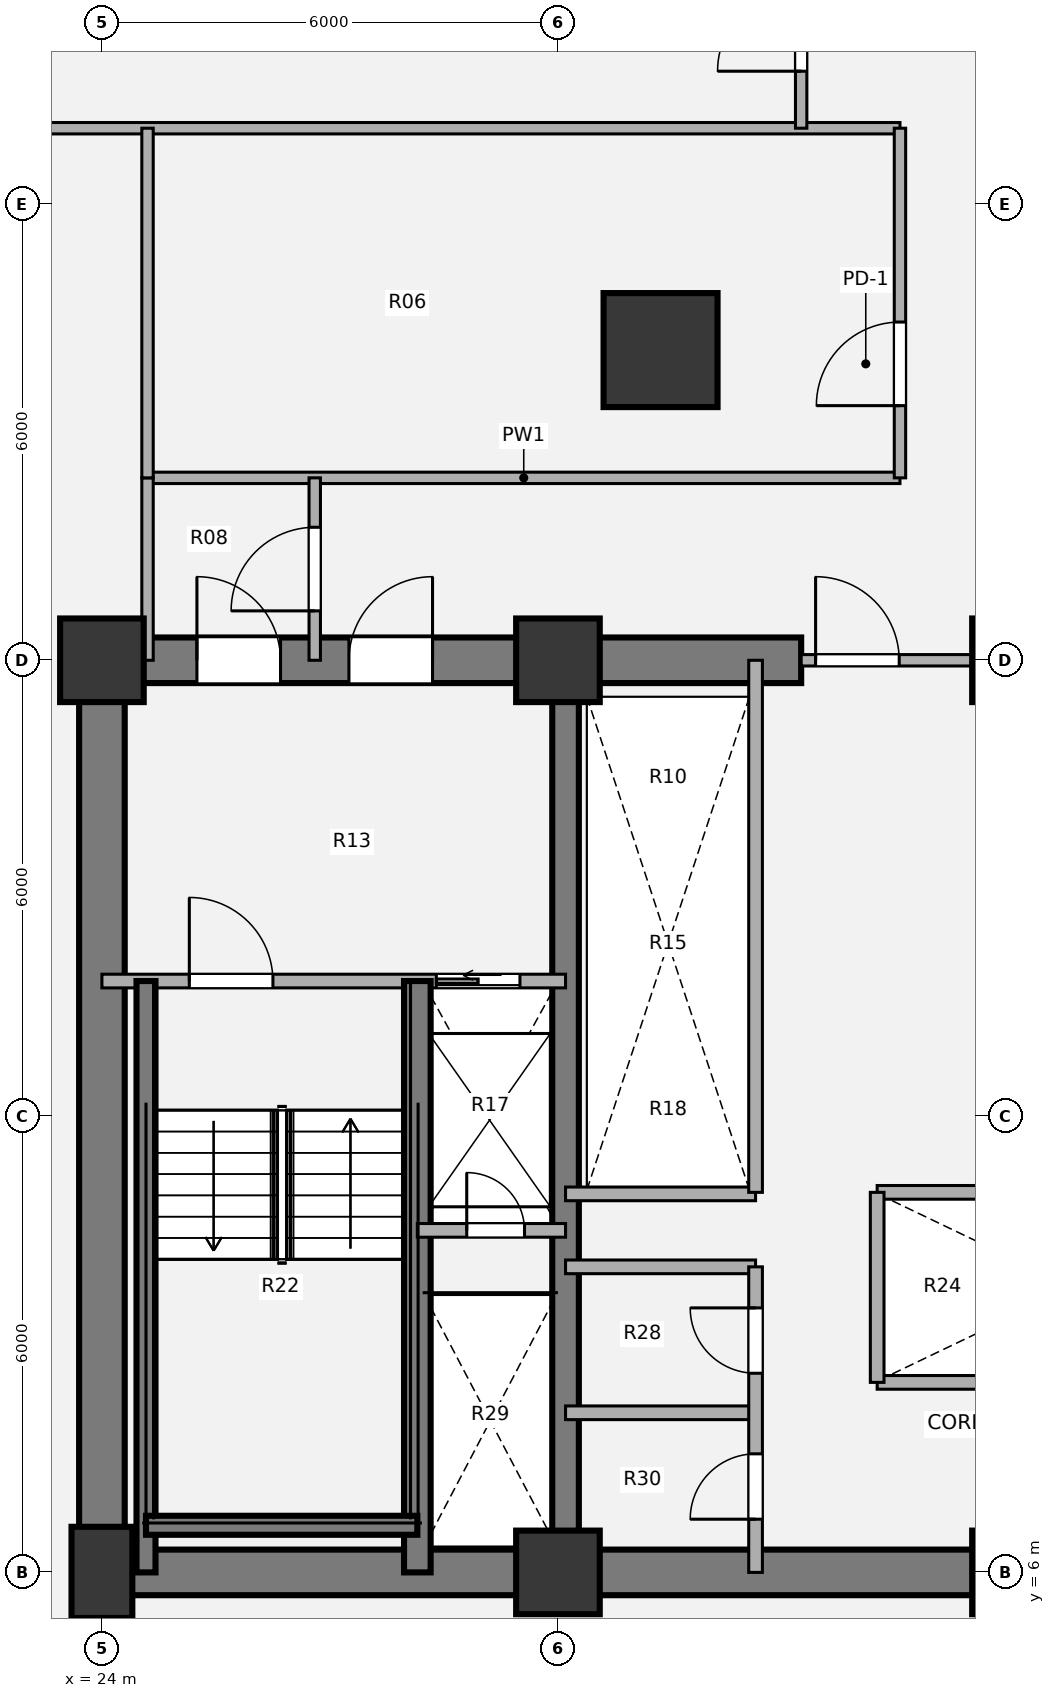
"""IFC4 building model, lengths in metres.
Left out: names, types, materials, properties, quantities, classifications, styles, units other than length and angle.
Written with IfcOpenShell. Run it as: python <this file> out.ifc"""

import sys

from ifc_helpers import new_model, si_unit, direction, frame, frame_2d, origin, origin_2d, place, context, subcontext, project, spatial, rectangle, hollow_circle, extrude, source, transform, mapped, element, fill, save


model = new_model("IFC4")
c1 = context("Model", 3, precision=1e-05, world=origin(), true_north=direction((0.0, 1.0)))
c2 = subcontext(c1, "Body", "Model", "MODEL_VIEW")
j1 = project(units=[si_unit("LENGTHUNIT", "METRE"), si_unit("PLANEANGLEUNIT", "RADIAN")], contexts=[c1])
p1 = place(None, origin())
s1 = spatial("IfcSite", under=j1, at=p1, CompositionType="ELEMENT")
p2 = place(p1, origin())
s2 = spatial("IfcBuilding", under=s1, at=p2, CompositionType="ELEMENT")
p3 = place(p2, frame((0.0, 0.0, 79.92)))
s3 = spatial("IfcBuildingStorey", under=s2, at=p3, CompositionType="ELEMENT", Elevation=79.92)
m1 = source(origin(), c2, "Body", "SweptSolid", [
    extrude(rectangle(XDim=0.8, YDim=1.2, at=origin_2d()), origin(), (0.0, 0.0, 1.0), 5.4),
])
p4 = place(p3, frame((24.0, 6.0, 0.0), z_axis=(0.0, 0.0, 1.0), x_axis=(1.0, 0.0, 0.0)))
e1 = element("IfcColumn", 1, at=p4, inside=s3, PredefinedType="COLUMN", context=c2, shape_type="MappedRepresentation", body=[
    mapped(m1, transform((0.0, 0.0, 0.0), x_axis=(1.0, 0.0, 0.0), y_axis=(0.0, 1.0, 0.0), z_axis=(0.0, 0.0, 1.0), scale=1.0)),
])
m2 = source(origin(), c2, "Body", "SweptSolid", [
    extrude(rectangle(XDim=1.1, YDim=1.1, at=origin_2d()), origin(), (0.0, 0.0, 1.0), 5.4),
])
for number, where, z_axis, x_axis in (
    (2, (30.0, 6.0, 0.0), (0.0, 0.0, 1.0), (1.0, 0.0, 0.0)),
    (3, (36.0, 6.0, 0.0), (0.0, 0.0, 1.0), (1.0, 0.0, 0.0)),
    (4, (24.0, 18.0, 0.0), (0.0, 0.0, 1.0), (1.0, 0.0, 0.0)),
    (5, (30.0, 18.0, 0.0), (0.0, 0.0, 1.0), (1.0, 0.0, 0.0)),
    (6, (36.0, 18.0, 0.0), (0.0, 0.0, 1.0), (1.0, 0.0, 0.0)),
):
    element("IfcColumn", number, at=place(p3, frame(where, z_axis=z_axis, x_axis=x_axis)), inside=s3, PredefinedType="COLUMN", context=c2, shape_type="MappedRepresentation", body=[
        mapped(m2, transform((0.0, 0.0, 0.0), x_axis=(1.0, 0.0, 0.0), y_axis=(0.0, 1.0, 0.0), z_axis=(0.0, 0.0, 1.0), scale=1.0)),
    ])
p5 = place(p3, frame((48.3, 6.0, 0.0), z_axis=(0.0, 0.0, 1.0), x_axis=(-1.0, 0.0, 0.0)))
e7 = element("IfcWall", 7, at=p5, inside=s3, PredefinedType="SHEAR", context=c2, shape_type="SweptSolid", body=[
    extrude(rectangle(XDim=24.6, YDim=0.6, at=frame_2d((12.3, 0.0))), origin(), (0.0, 0.0, 1.0), 5.4),
])
p6 = place(p3, frame((24.0, 6.0, 0.0), z_axis=(0.0, 0.0, 1.0), x_axis=(0.0, 1.0, 0.0)))
e8 = element("IfcWall", 8, at=p6, inside=s3, PredefinedType="SHEAR", context=c2, shape_type="SweptSolid", body=[
    extrude(rectangle(XDim=12.0, YDim=0.6, at=frame_2d((6.0, 0.0))), origin(), (0.0, 0.0, 1.0), 5.4),
])
p7 = place(p3, frame((23.7, 18.0, 0.0), z_axis=(0.0, 0.0, 1.0), x_axis=(1.0, 0.0, 0.0)))
e9 = element("IfcWall", 9, at=p7, inside=s3, PredefinedType="SHEAR", context=c2, shape_type="SweptSolid", body=[
    extrude(rectangle(XDim=9.5, YDim=0.6, at=frame_2d((4.75, 0.0))), origin(), (0.0, 0.0, 1.0), 5.4),
])
p8 = place(p7, frame((1.55, 0.0, 0.0)))
e10 = element("IfcOpeningElement", 10, at=p8, cuts=e9, PredefinedType="OPENING", context=c2, shape_type="SweptSolid", body=[
    extrude(rectangle(XDim=1.1, YDim=2.1, at=origin_2d()), frame((0.55, 0.31, 1.05), z_axis=(0.0, -1.0, 0.0), x_axis=(1.0, 0.0, 0.0)), (0.0, 0.0, 1.0), 0.62),
])
p9 = place(p7, frame((3.55, 0.0, 0.0)))
e11 = element("IfcOpeningElement", 11, at=p9, cuts=e9, PredefinedType="OPENING", context=c2, shape_type="SweptSolid", body=[
    extrude(rectangle(XDim=1.1, YDim=2.1, at=origin_2d()), frame((0.55, 0.31, 1.05), z_axis=(0.0, -1.0, 0.0), x_axis=(1.0, 0.0, 0.0)), (0.0, 0.0, 1.0), 0.62),
])
p10 = place(p3, frame((30.1, 6.0, 0.0), z_axis=(0.0, 0.0, 1.0), x_axis=(0.0, 1.0, 0.0)))
e12 = element("IfcWall", 12, at=p10, inside=s3, PredefinedType="SHEAR", context=c2, shape_type="SweptSolid", body=[
    extrude(rectangle(XDim=12.0, YDim=0.35, at=frame_2d((6.0, 0.0))), origin(), (0.0, 0.0, 1.0), 5.4),
])
m3 = source(origin(), c2, "Body", "SweptSolid", [
    extrude(hollow_circle(Radius=0.75, WallThickness=0.05, at=origin_2d()), origin(), (0.0, 0.0, 1.0), 6.108),
])
p11 = place(p3, frame((31.35, 20.285, 0.46), z_axis=(0.0, 0.588155061487, 0.808748183087), x_axis=(-1.0, 0.0, 0.0)))
e13 = element("IfcColumn", 13, at=p11, inside=s3, PredefinedType="COLUMN", context=c2, shape_type="MappedRepresentation", body=[
    mapped(m3, transform((0.0, 0.0, 0.0), x_axis=(1.0, 0.0, 0.0), y_axis=(0.0, 1.0, 0.0), z_axis=(0.0, 0.0, 1.0), scale=1.0)),
])
for number, where, z_axis, x_axis in (
    (14, (34.2, 11.0, 0.0), (0.0, 0.0, 1.0), (1.0, 0.0, 0.0)),
    (15, (34.2, 8.5, 0.0), (0.0, 0.0, 1.0), (1.0, 0.0, 0.0)),
):
    element("IfcWall", number, at=place(p3, frame(where, z_axis=z_axis, x_axis=x_axis)), inside=s3, PredefinedType="PARTITIONING", context=c2, shape_type="SweptSolid", body=[
        extrude(rectangle(XDim=5.15, YDim=0.18, at=frame_2d((2.575, 0.0))), origin(), (0.0, 0.0, 1.0), 5.05),
    ])
for number, where, z_axis, x_axis in (
    (16, (34.2, 8.5, 0.0), (0.0, 0.0, 1.0), (0.0, 1.0, 0.0)),
    (17, (30.1, 10.98, 0.0), (0.0, 0.0, 1.0), (1.0, 0.0, 0.0)),
    (18, (30.1, 8.1, 0.0), (0.0, 0.0, 1.0), (1.0, 0.0, 0.0)),
    (19, (30.1, 10.02, 0.0), (0.0, 0.0, 1.0), (1.0, 0.0, 0.0)),
):
    element("IfcWall", number, at=place(p3, frame(where, z_axis=z_axis, x_axis=x_axis)), inside=s3, PredefinedType="PARTITIONING", context=c2, shape_type="SweptSolid", body=[
        extrude(rectangle(XDim=2.5, YDim=0.18, at=frame_2d((1.25, 0.0))), origin(), (0.0, 0.0, 1.0), 5.05),
    ])
p12 = place(p3, frame((32.6, 6.0, 0.0), z_axis=(0.0, 0.0, 1.0), x_axis=(0.0, 1.0, 0.0)))
e20 = element("IfcWall", 20, at=p12, inside=s3, PredefinedType="PARTITIONING", context=c2, shape_type="SweptSolid", body=[
    extrude(rectangle(XDim=4.02, YDim=0.18, at=frame_2d((2.01, 0.0))), origin(), (0.0, 0.0, 1.0), 5.05),
])
p13 = place(p12, frame((0.7, 0.0, 0.0)))
e21 = element("IfcOpeningElement", 21, at=p13, cuts=e20, PredefinedType="OPENING", context=c2, shape_type="SweptSolid", body=[
    extrude(rectangle(XDim=0.86, YDim=2.1, at=origin_2d()), frame((0.43, 0.1, 1.05), z_axis=(0.0, -1.0, 0.0), x_axis=(1.0, 0.0, 0.0)), (0.0, 0.0, 1.0), 0.2),
])
p14 = place(p12, frame((2.62, 0.0, 0.0)))
e22 = element("IfcOpeningElement", 22, at=p14, cuts=e20, PredefinedType="OPENING", context=c2, shape_type="SweptSolid", body=[
    extrude(rectangle(XDim=0.86, YDim=2.1, at=origin_2d()), frame((0.43, 0.1, 1.05), z_axis=(0.0, -1.0, 0.0), x_axis=(1.0, 0.0, 0.0)), (0.0, 0.0, 1.0), 0.2),
])
p15 = place(p3, frame((33.2, 18.0, 0.0), z_axis=(0.0, 0.0, 1.0), x_axis=(1.0, 0.0, 0.0)))
e23 = element("IfcWall", 23, at=p15, inside=s3, PredefinedType="PARTITIONING", context=c2, shape_type="SweptSolid", body=[
    extrude(rectangle(XDim=5.6, YDim=0.15, at=frame_2d((2.8, 0.0))), origin(), (0.0, 0.0, 1.0), 3.865),
])
p16 = place(p15, frame((0.19, 0.0, 0.0)))
e24 = element("IfcOpeningElement", 24, at=p16, cuts=e23, PredefinedType="OPENING", context=c2, shape_type="SweptSolid", body=[
    extrude(rectangle(XDim=1.1, YDim=2.1, at=origin_2d()), frame((0.55, 0.085, 1.05), z_axis=(0.0, -1.0, 0.0), x_axis=(1.0, 0.0, 0.0)), (0.0, 0.0, 1.0), 0.17),
])
p17 = place(p15, frame((4.31, 0.0, 0.0)))
e25 = element("IfcOpeningElement", 25, at=p17, cuts=e23, PredefinedType="OPENING", context=c2, shape_type="SweptSolid", body=[
    extrude(rectangle(XDim=1.1, YDim=2.1, at=origin_2d()), frame((0.55, 0.085, 1.05), z_axis=(0.0, -1.0, 0.0), x_axis=(1.0, 0.0, 0.0)), (0.0, 0.0, 1.0), 0.17),
])
p18 = place(p3, frame((24.0, 13.78, 0.0), z_axis=(0.0, 0.0, 1.0), x_axis=(1.0, 0.0, 0.0)))
e26 = element("IfcWall", 26, at=p18, inside=s3, PredefinedType="PARTITIONING", context=c2, shape_type="SweptSolid", body=[
    extrude(rectangle(XDim=6.1, YDim=0.18, at=frame_2d((3.05, 0.0))), origin(), (0.0, 0.0, 1.0), 2.229),
])
p19 = place(p18, frame((1.15, 0.0, 0.0)))
e27 = element("IfcOpeningElement", 27, at=p19, cuts=e26, PredefinedType="OPENING", context=c2, shape_type="SweptSolid", body=[
    extrude(rectangle(XDim=1.1, YDim=2.1, at=origin_2d()), frame((0.55, 0.1, 1.05), z_axis=(0.0, -1.0, 0.0), x_axis=(1.0, 0.0, 0.0)), (0.0, 0.0, 1.0), 0.2),
])
p20 = place(p18, frame((4.4, 0.0, 0.0)))
e28 = element("IfcOpeningElement", 28, at=p20, cuts=e26, PredefinedType="OPENING", context=c2, shape_type="SweptSolid", body=[
    extrude(rectangle(XDim=1.1, YDim=2.1, at=origin_2d()), frame((0.55, 0.1, 1.05), z_axis=(0.0, -1.0, 0.0), x_axis=(1.0, 0.0, 0.0)), (0.0, 0.0, 1.0), 0.2),
])
p21 = place(p3, frame((28.15, 6.0, 0.0), z_axis=(0.0, 0.0, 1.0), x_axis=(0.0, 1.0, 0.0)))
e29 = element("IfcWall", 29, at=p21, inside=s3, PredefinedType="SHEAR", context=c2, shape_type="SweptSolid", body=[
    extrude(rectangle(XDim=7.78, YDim=0.35, at=frame_2d((3.89, 0.0))), origin(), (0.0, 0.0, 1.0), 5.4),
])
p22 = place(p3, frame((24.58, 6.0, 0.0), z_axis=(0.0, 0.0, 1.0), x_axis=(0.0, 1.0, 0.0)))
e30 = element("IfcWall", 30, at=p22, inside=s3, PredefinedType="SHEAR", context=c2, shape_type="SweptSolid", body=[
    extrude(rectangle(XDim=7.78, YDim=0.25, at=frame_2d((3.89, 0.0))), origin(), (0.0, 0.0, 1.0), 5.4),
])
p23 = place(p3, frame((24.58, 6.62, 0.0), z_axis=(0.0, 0.0, 1.0), x_axis=(1.0, 0.0, 0.0)))
e31 = element("IfcWall", 31, at=p23, inside=s3, PredefinedType="SHEAR", context=c2, shape_type="SweptSolid", body=[
    extrude(rectangle(XDim=3.57, YDim=0.25, at=frame_2d((1.785, 0.0))), origin(), (0.0, 0.0, 1.0), 5.4),
])
p24 = place(p3, frame((28.15, 10.5, 0.0), z_axis=(0.0, 0.0, 1.0), x_axis=(1.0, 0.0, 0.0)))
e32 = element("IfcWall", 32, at=p24, inside=s3, PredefinedType="PARTITIONING", context=c2, shape_type="SweptSolid", body=[
    extrude(rectangle(XDim=1.95, YDim=0.18, at=frame_2d((0.975, 0.0))), origin(), (0.0, 0.0, 1.0), 5.05),
])
p25 = place(p24, frame((0.65, 0.0, 0.0)))
e33 = element("IfcOpeningElement", 33, at=p25, cuts=e32, PredefinedType="OPENING", context=c2, shape_type="SweptSolid", body=[
    extrude(rectangle(XDim=0.76, YDim=2.05, at=origin_2d()), frame((0.38, 0.1, 1.025), z_axis=(0.0, -1.0, 0.0), x_axis=(1.0, 0.0, 0.0)), (0.0, 0.0, 1.0), 0.2),
])
p26 = place(p3, frame((32.6, 11.0, 0.0), z_axis=(0.0, 0.0, 1.0), x_axis=(0.0, 1.0, 0.0)))
e34 = element("IfcWall", 34, at=p26, inside=s3, PredefinedType="PARTITIONING", context=c2, shape_type="SweptSolid", body=[
    extrude(rectangle(XDim=7.0, YDim=0.18, at=frame_2d((3.5, 0.0))), origin(), (0.0, 0.0, 1.0), 5.05),
])
p27 = place(p3, frame((24.6, 20.4, 0.0), z_axis=(0.0, 0.0, 1.0), x_axis=(1.0, 0.0, 0.0)))
e35 = element("IfcWall", 35, at=p27, inside=s3, PredefinedType="PARTITIONING", context=c2, shape_type="SweptSolid", body=[
    extrude(rectangle(XDim=9.9, YDim=0.15, at=frame_2d((4.95, 0.0))), origin(), (0.0, 0.0, 1.0), 5.05),
])
p28 = place(p3, frame((14.6, 25.0, 0.0), z_axis=(0.0, 0.0, 1.0), x_axis=(1.0, 0.0, 0.0)))
e36 = element("IfcWall", 36, at=p28, inside=s3, PredefinedType="PARTITIONING", context=c2, shape_type="SweptSolid", body=[
    extrude(rectangle(XDim=19.9, YDim=0.15, at=frame_2d((9.95, 0.0))), origin(), (0.0, 0.0, 1.0), 4.532),
])
p29 = place(p3, frame((24.6, 18.0, 0.0), z_axis=(0.0, 0.0, 1.0), x_axis=(0.0, 1.0, 0.0)))
e37 = element("IfcWall", 37, at=p29, inside=s3, PredefinedType="PARTITIONING", context=c2, shape_type="SweptSolid", body=[
    extrude(rectangle(XDim=2.4, YDim=0.15, at=frame_2d((1.2, 0.0))), origin(), (0.0, 0.0, 1.0), 5.05),
])
p30 = place(p3, frame((24.6, 20.4, 0.0), z_axis=(0.0, 0.0, 1.0), x_axis=(0.0, 1.0, 0.0)))
e38 = element("IfcWall", 38, at=p30, inside=s3, PredefinedType="PARTITIONING", context=c2, shape_type="SweptSolid", body=[
    extrude(rectangle(XDim=4.6, YDim=0.15, at=frame_2d((2.3, 0.0))), origin(), (0.0, 0.0, 1.0), 5.05),
])
p31 = place(p3, frame((26.8, 18.0, 0.0), z_axis=(0.0, 0.0, 1.0), x_axis=(0.0, 1.0, 0.0)))
e39 = element("IfcWall", 39, at=p31, inside=s3, PredefinedType="PARTITIONING", context=c2, shape_type="SweptSolid", body=[
    extrude(rectangle(XDim=2.4, YDim=0.15, at=frame_2d((1.2, 0.0))), origin(), (0.0, 0.0, 1.0), 5.05),
])
p32 = place(p31, frame((0.65, 0.0, 0.0)))
e40 = element("IfcOpeningElement", 40, at=p32, cuts=e39, PredefinedType="OPENING", context=c2, shape_type="SweptSolid", body=[
    extrude(rectangle(XDim=1.1, YDim=2.1, at=origin_2d()), frame((0.55, 0.085, 1.05), z_axis=(0.0, -1.0, 0.0), x_axis=(1.0, 0.0, 0.0)), (0.0, 0.0, 1.0), 0.17),
])
p33 = place(p3, frame((33.2, 25.0, 0.0), z_axis=(0.0, 0.0, 1.0), x_axis=(0.0, 1.0, 0.0)))
e41 = element("IfcWall", 41, at=p33, inside=s3, PredefinedType="PARTITIONING", context=c2, shape_type="SweptSolid", body=[
    extrude(rectangle(XDim=2.6, YDim=0.15, at=frame_2d((1.3, 0.0))), origin(), (0.0, 0.0, 1.0), 5.05),
])
p34 = place(p33, frame((0.75, 0.0, 0.0)))
e42 = element("IfcOpeningElement", 42, at=p34, cuts=e41, PredefinedType="OPENING", context=c2, shape_type="SweptSolid", body=[
    extrude(rectangle(XDim=1.1, YDim=2.1, at=origin_2d()), frame((0.55, 0.085, 1.05), z_axis=(0.0, -1.0, 0.0), x_axis=(1.0, 0.0, 0.0)), (0.0, 0.0, 1.0), 0.17),
])
p35 = place(p3, frame((34.5, 20.4, 0.0), z_axis=(0.0, 0.0, 1.0), x_axis=(0.0, 1.0, 0.0)))
e43 = element("IfcWall", 43, at=p35, inside=s3, PredefinedType="PARTITIONING", context=c2, shape_type="SweptSolid", body=[
    extrude(rectangle(XDim=4.6, YDim=0.15, at=frame_2d((2.3, 0.0))), origin(), (0.0, 0.0, 1.0), 5.05),
])
p36 = place(p35, frame((0.95, 0.0, 0.0)))
e44 = element("IfcOpeningElement", 44, at=p36, cuts=e43, PredefinedType="OPENING", context=c2, shape_type="SweptSolid", body=[
    extrude(rectangle(XDim=1.1, YDim=2.1, at=origin_2d()), frame((0.55, 0.085, 1.05), z_axis=(0.0, -1.0, 0.0), x_axis=(1.0, 0.0, 0.0)), (0.0, 0.0, 1.0), 0.17),
])
m4 = source(origin(), c2, "Body", "SweptSolid", [
    extrude(rectangle(XDim=0.86, YDim=2.1, at=origin_2d()), frame((0.43, 0.025, 1.05), z_axis=(0.0, -1.0, 0.0), x_axis=(1.0, 0.0, 0.0)), (0.0, 0.0, 1.0), 0.05),
])
p37 = place(p13, origin())
e45 = element("IfcDoor", 45, at=p37, inside=s3, OperationType="SINGLE_SWING_LEFT", PredefinedType="DOOR", context=c2, shape_type="MappedRepresentation", body=[
    mapped(m4, transform((0.0, 0.0, 0.0), x_axis=(1.0, 0.0, 0.0), y_axis=(0.0, 1.0, 0.0), z_axis=(0.0, 0.0, 1.0), scale=1.0)),
])
fill(e21, e45)
p38 = place(p14, origin())
e46 = element("IfcDoor", 46, at=p38, inside=s3, OperationType="SINGLE_SWING_RIGHT", PredefinedType="DOOR", context=c2, shape_type="MappedRepresentation", body=[
    mapped(m4, transform((0.0, 0.0, 0.0), x_axis=(1.0, 0.0, 0.0), y_axis=(0.0, 1.0, 0.0), z_axis=(0.0, 0.0, 1.0), scale=1.0)),
])
fill(e22, e46)
m5 = source(origin(), c2, "Body", "SweptSolid", [
    extrude(rectangle(XDim=1.1, YDim=2.1, at=origin_2d()), frame((0.55, 0.025, 1.05), z_axis=(0.0, -1.0, 0.0), x_axis=(1.0, 0.0, 0.0)), (0.0, 0.0, 1.0), 0.05),
])
p39 = place(p16, origin())
e47 = element("IfcDoor", 47, at=p39, inside=s3, OperationType="SINGLE_SWING_LEFT", PredefinedType="DOOR", context=c2, shape_type="MappedRepresentation", body=[
    mapped(m5, transform((0.0, 0.0, 0.0), x_axis=(1.0, 0.0, 0.0), y_axis=(0.0, 1.0, 0.0), z_axis=(0.0, 0.0, 1.0), scale=1.0)),
])
fill(e24, e47)
m6 = source(origin(), c2, "Body", "SweptSolid", [
    extrude(rectangle(XDim=1.1, YDim=2.1, at=origin_2d()), frame((0.55, 0.025, 1.05), z_axis=(0.0, -1.0, 0.0), x_axis=(1.0, 0.0, 0.0)), (0.0, 0.0, 1.0), 0.05),
])
p40 = place(p19, origin())
e48 = element("IfcDoor", 48, at=p40, inside=s3, OperationType="SINGLE_SWING_LEFT", PredefinedType="DOOR", context=c2, shape_type="MappedRepresentation", body=[
    mapped(m6, transform((0.0, 0.0, 0.0), x_axis=(1.0, 0.0, 0.0), y_axis=(0.0, 1.0, 0.0), z_axis=(0.0, 0.0, 1.0), scale=1.0)),
])
fill(e27, e48)
m7 = source(origin(), c2, "Body", "SweptSolid", [
    extrude(rectangle(XDim=1.1, YDim=2.1, at=origin_2d()), frame((0.55, 0.025, 1.05), z_axis=(0.0, -1.0, 0.0), x_axis=(1.0, 0.0, 0.0)), (0.0, 0.0, 1.0), 0.05),
])
p41 = place(p20, origin())
e49 = element("IfcDoor", 49, at=p41, inside=s3, OperationType="SLIDING_TO_LEFT", PredefinedType="DOOR", context=c2, shape_type="MappedRepresentation", body=[
    mapped(m7, transform((0.0, 0.0, 0.0), x_axis=(1.0, 0.0, 0.0), y_axis=(0.0, 1.0, 0.0), z_axis=(0.0, 0.0, 1.0), scale=1.0)),
])
fill(e28, e49)
m8 = source(origin(), c2, "Body", "SweptSolid", [
    extrude(rectangle(XDim=0.76, YDim=2.05, at=origin_2d()), frame((0.38, 0.025, 1.025), z_axis=(0.0, -1.0, 0.0), x_axis=(1.0, 0.0, 0.0)), (0.0, 0.0, 1.0), 0.05),
])
p42 = place(p25, origin())
e50 = element("IfcDoor", 50, at=p42, inside=s3, OperationType="SINGLE_SWING_LEFT", PredefinedType="DOOR", context=c2, shape_type="MappedRepresentation", body=[
    mapped(m8, transform((0.0, 0.0, 0.0), x_axis=(1.0, 0.0, 0.0), y_axis=(0.0, 1.0, 0.0), z_axis=(0.0, 0.0, 1.0), scale=1.0)),
])
fill(e33, e50)
p43 = place(p8, origin())
e51 = element("IfcDoor", 51, at=p43, inside=s3, OperationType="SINGLE_SWING_LEFT", PredefinedType="DOOR", context=c2, shape_type="MappedRepresentation", body=[
    mapped(m5, transform((0.0, 0.0, 0.0), x_axis=(1.0, 0.0, 0.0), y_axis=(0.0, 1.0, 0.0), z_axis=(0.0, 0.0, 1.0), scale=1.0)),
])
fill(e10, e51)
p44 = place(p9, origin())
e52 = element("IfcDoor", 52, at=p44, inside=s3, OperationType="SINGLE_SWING_RIGHT", PredefinedType="DOOR", context=c2, shape_type="MappedRepresentation", body=[
    mapped(m5, transform((0.0, 0.0, 0.0), x_axis=(1.0, 0.0, 0.0), y_axis=(0.0, 1.0, 0.0), z_axis=(0.0, 0.0, 1.0), scale=1.0)),
])
fill(e11, e52)
m9 = source(origin(), c2, "Body", "SweptSolid", [
    extrude(rectangle(XDim=1.1, YDim=2.1, at=origin_2d()), frame((0.55, 0.025, 1.05), z_axis=(0.0, -1.0, 0.0), x_axis=(1.0, 0.0, 0.0)), (0.0, 0.0, 1.0), 0.05),
])
p45 = place(p32, origin())
e53 = element("IfcDoor", 53, at=p45, inside=s3, OperationType="SINGLE_SWING_LEFT", PredefinedType="DOOR", context=c2, shape_type="MappedRepresentation", body=[
    mapped(m9, transform((0.0, 0.0, 0.0), x_axis=(1.0, 0.0, 0.0), y_axis=(0.0, 1.0, 0.0), z_axis=(0.0, 0.0, 1.0), scale=1.0)),
])
fill(e40, e53)
p46 = place(p34, origin())
e54 = element("IfcDoor", 54, at=p46, inside=s3, OperationType="SINGLE_SWING_LEFT", PredefinedType="DOOR", context=c2, shape_type="MappedRepresentation", body=[
    mapped(m9, transform((0.0, 0.0, 0.0), x_axis=(1.0, 0.0, 0.0), y_axis=(0.0, 1.0, 0.0), z_axis=(0.0, 0.0, 1.0), scale=1.0)),
])
fill(e42, e54)
p47 = place(p36, origin())
e55 = element("IfcDoor", 55, at=p47, inside=s3, OperationType="SINGLE_SWING_LEFT", PredefinedType="DOOR", context=c2, shape_type="MappedRepresentation", body=[
    mapped(m9, transform((0.0, 0.0, 0.0), x_axis=(1.0, 0.0, 0.0), y_axis=(0.0, 1.0, 0.0), z_axis=(0.0, 0.0, 1.0), scale=1.0)),
])
fill(e44, e55)
save(model, sys.argv[1])
